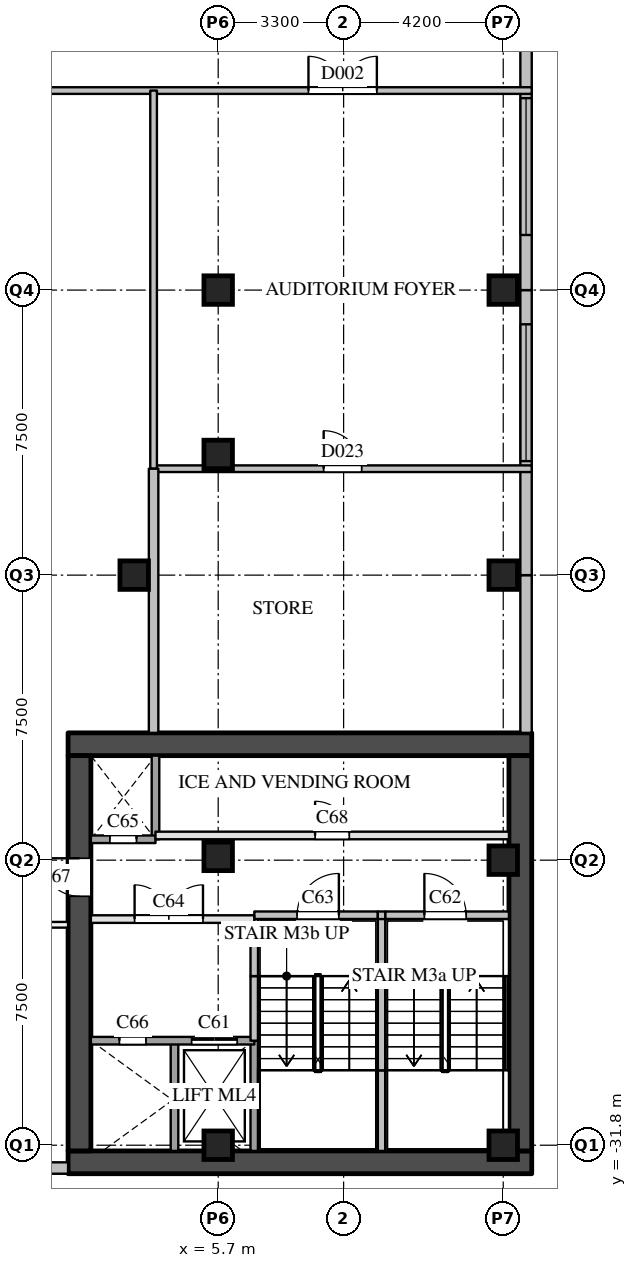
"""IFC4 building model, lengths in metres.
Left out: names, types, materials, properties, quantities, classifications, styles, units other than length and angle.
Written with IfcOpenShell. Run it as: python <this file> out.ifc"""

import sys

from ifc_helpers import new_model, si_unit, direction, frame, frame_2d, origin, origin_2d, place, context, subcontext, project, spatial, rectangle, extrude, element, fill, save


model = new_model("IFC4")
c1 = context("Model", 3, precision=1e-05, world=origin(), true_north=direction((0.0, 1.0)))
c2 = subcontext(c1, "Body", "Model", "MODEL_VIEW")
j1 = project(units=[si_unit("LENGTHUNIT", "METRE"), si_unit("PLANEANGLEUNIT", "RADIAN")], contexts=[c1])
p1 = place(None, origin())
s1 = spatial("IfcSite", under=j1, at=p1, CompositionType="ELEMENT")
p2 = place(p1, origin())
s2 = spatial("IfcBuilding", under=s1, at=p2, CompositionType="ELEMENT")
p3 = place(p2, frame((0.0, 0.0, 8.0)))
s3 = spatial("IfcBuildingStorey", under=s2, at=p3, CompositionType="ELEMENT", Elevation=8.0)
for number, where, z_axis, x_axis in (
    (1, (5.7, -31.8, 0.0), (0.0, 0.0, 1.0), (1.0, 0.0, 0.0)),
    (2, (5.7, -24.2, 0.0), (0.0, 0.0, 1.0), (1.0, 0.0, 0.0)),
    (3, (5.7, -9.3, 0.0), (0.0, 0.0, 1.0), (1.0, 0.0, 0.0)),
    (4, (13.2, -31.8, 0.0), (0.0, 0.0, 1.0), (1.0, 0.0, 0.0)),
    (5, (13.2, -24.3, 0.0), (0.0, 0.0, 1.0), (1.0, 0.0, 0.0)),
    (6, (13.2, -16.8, 0.0), (0.0, 0.0, 1.0), (1.0, 0.0, 0.0)),
    (7, (13.2, -9.3, 0.0), (0.0, 0.0, 1.0), (1.0, 0.0, 0.0)),
    (8, (5.7, -13.625, 0.0), (0.0, 0.0, 1.0), (1.0, 0.0, 0.0)),
):
    element("IfcColumn", number, at=place(p3, frame(where, z_axis=z_axis, x_axis=x_axis)), inside=s3, PredefinedType="COLUMN", context=c2, shape_type="SweptSolid", body=[
        extrude(rectangle(XDim=0.75, YDim=0.75, at=origin_2d()), origin(), (0.0, 0.0, 1.0), 6.0),
    ])
p4 = place(p3, frame((3.49, -16.8, 0.0), z_axis=(0.0, 0.0, 1.0), x_axis=(1.0, 0.0, 0.0)))
e9 = element("IfcColumn", 9, at=p4, inside=s3, PredefinedType="COLUMN", context=c2, shape_type="SweptSolid", body=[
    extrude(rectangle(XDim=0.75, YDim=0.75, at=origin_2d()), origin(), (0.0, 0.0, 1.0), 3.69),
])
p5 = place(p3, frame((-1.8, -32.4, 0.0), z_axis=(0.0, 0.0, 1.0), x_axis=(1.0, 0.0, 0.0)))
e10 = element("IfcWall", 10, at=p5, inside=s3, PredefinedType="SOLIDWALL", context=c2, shape_type="SweptSolid", body=[
    extrude(rectangle(XDim=3.55, YDim=0.3, at=frame_2d((1.775, 0.0))), origin(), (0.0, 0.0, 1.0), 5.59),
])
p6 = place(p3, frame((13.8, -20.95, 0.0), z_axis=(0.0, 0.0, 1.0), x_axis=(0.0, 1.0, 0.0)))
e11 = element("IfcWall", 11, at=p6, inside=s3, PredefinedType="SOLIDWALL", context=c2, shape_type="SweptSolid", body=[
    extrude(rectangle(XDim=4.15, YDim=0.3, at=frame_2d((2.075, 0.0))), origin(), (0.0, 0.0, 1.0), 5.59),
])
p7 = place(p3, frame((13.8, -16.8, 0.0), z_axis=(0.0, 0.0, 1.0), x_axis=(0.0, 1.0, 0.0)))
e12 = element("IfcWall", 12, at=p7, inside=s3, PredefinedType="SOLIDWALL", context=c2, shape_type="SweptSolid", body=[
    extrude(rectangle(XDim=7.5, YDim=0.3, at=frame_2d((3.75, 0.0))), origin(), (0.0, 0.0, 1.0), 5.59),
])
p8 = place(p7, frame((3.0, 0.0, 2.4)))
e13 = element("IfcOpeningElement", 13, at=p8, cuts=e12, PredefinedType="OPENING", context=c2, shape_type="SweptSolid", body=[
    extrude(rectangle(XDim=3.6, YDim=1.2, at=frame_2d((1.8, 0.6))), frame((0.0, 0.16, 0.0), z_axis=(0.0, -1.0, 0.0), x_axis=(1.0, 0.0, 0.0)), (0.0, 0.0, 1.0), 0.32),
])
p9 = place(p3, frame((13.8, -9.3, 0.0), z_axis=(0.0, 0.0, 1.0), x_axis=(0.0, 1.0, 0.0)))
e14 = element("IfcWall", 14, at=p9, inside=s3, PredefinedType="SOLIDWALL", context=c2, shape_type="SweptSolid", body=[
    extrude(rectangle(XDim=7.5, YDim=0.3, at=frame_2d((3.75, 0.0))), origin(), (0.0, 0.0, 1.0), 5.59),
])
p10 = place(p9, frame((1.45, 0.0, 2.4)))
e15 = element("IfcOpeningElement", 15, at=p10, cuts=e14, PredefinedType="OPENING", context=c2, shape_type="SweptSolid", body=[
    extrude(rectangle(XDim=3.6, YDim=1.2, at=frame_2d((1.8, 0.6))), frame((0.0, 0.16, 0.0), z_axis=(0.0, -1.0, 0.0), x_axis=(1.0, 0.0, 0.0)), (0.0, 0.0, 1.0), 0.32),
])
for number, where, z_axis, x_axis in (
    (16, (1.75, -32.25, 0.0), (0.0, 0.0, 1.0), (1.0, 0.0, 0.0)),
    (17, (1.75, -21.25, 0.0), (0.0, 0.0, 1.0), (1.0, 0.0, 0.0)),
):
    element("IfcWall", number, at=place(p3, frame(where, z_axis=z_axis, x_axis=x_axis)), inside=s3, PredefinedType="SHEAR", context=c2, shape_type="SweptSolid", body=[
        extrude(rectangle(XDim=12.2, YDim=0.6, at=frame_2d((6.1, 0.0))), origin(), (0.0, 0.0, 1.0), 5.59),
    ])
p11 = place(p3, frame((2.05, -31.95, 0.0), z_axis=(0.0, 0.0, 1.0), x_axis=(0.0, 1.0, 0.0)))
e18 = element("IfcWall", 18, at=p11, inside=s3, PredefinedType="SHEAR", context=c2, shape_type="SweptSolid", body=[
    extrude(rectangle(XDim=10.4, YDim=0.6, at=frame_2d((5.2, 0.0))), origin(), (0.0, 0.0, 1.0), 5.59),
])
p12 = place(p11, frame((6.7, 0.0, 0.0)))
e19 = element("IfcOpeningElement", 19, at=p12, cuts=e18, PredefinedType="OPENING", context=c2, shape_type="SweptSolid", body=[
    extrude(rectangle(XDim=1.0, YDim=2.1, at=frame_2d((0.5, 1.05))), frame((0.0, 0.31, 0.0), z_axis=(0.0, -1.0, 0.0), x_axis=(1.0, 0.0, 0.0)), (0.0, 0.0, 1.0), 0.62),
])
p13 = place(p3, frame((13.65, -31.95, 0.0), z_axis=(0.0, 0.0, 1.0), x_axis=(0.0, 1.0, 0.0)))
e20 = element("IfcWall", 20, at=p13, inside=s3, PredefinedType="SHEAR", context=c2, shape_type="SweptSolid", body=[
    extrude(rectangle(XDim=10.4, YDim=0.6, at=frame_2d((5.2, 0.0))), origin(), (0.0, 0.0, 1.0), 5.59),
])
p14 = place(p3, frame((4.05, -23.75, 0.0), z_axis=(0.0, 0.0, 1.0), x_axis=(0.0, 1.0, 0.0)))
e21 = element("IfcWall", 21, at=p14, inside=s3, PredefinedType="SOLIDWALL", context=c2, shape_type="SweptSolid", body=[
    extrude(rectangle(XDim=2.2, YDim=0.2, at=frame_2d((1.1, 0.0))), origin(), (0.0, 0.0, 1.0), 5.59),
])
for number, where, z_axis, x_axis in (
    (22, (4.55, -31.95, 0.0), (0.0, 0.0, 1.0), (0.0, 1.0, 0.0)),
    (23, (6.65, -31.95, 0.0), (0.0, 0.0, 1.0), (0.0, 1.0, 0.0)),
):
    element("IfcWall", number, at=place(p3, frame(where, z_axis=z_axis, x_axis=x_axis)), inside=s3, PredefinedType="SOLIDWALL", context=c2, shape_type="SweptSolid", body=[
        extrude(rectangle(XDim=2.9, YDim=0.2, at=frame_2d((1.45, 0.0))), origin(), (0.0, 0.0, 1.0), 5.59),
    ])
p15 = place(p3, frame((6.65, -29.05, 0.0), z_axis=(0.0, 0.0, 1.0), x_axis=(0.0, 1.0, 0.0)))
e24 = element("IfcWall", 24, at=p15, inside=s3, PredefinedType="SOLIDWALL", context=c2, shape_type="SweptSolid", body=[
    extrude(rectangle(XDim=1.7, YDim=0.2, at=frame_2d((0.85, 0.0))), origin(), (0.0, 0.0, 1.0), 5.59),
])
p16 = place(p3, frame((6.65, -27.35, 0.0), z_axis=(0.0, 0.0, 1.0), x_axis=(0.0, 1.0, 0.0)))
e25 = element("IfcWall", 25, at=p16, inside=s3, PredefinedType="SOLIDWALL", context=c2, shape_type="SweptSolid", body=[
    extrude(rectangle(XDim=1.6, YDim=0.2, at=frame_2d((0.8, 0.0))), origin(), (0.0, 0.0, 1.0), 5.59),
])
p17 = place(p3, frame((10.0, -31.95, 0.0), z_axis=(0.0, 0.0, 1.0), x_axis=(0.0, 1.0, 0.0)))
e26 = element("IfcWall", 26, at=p17, inside=s3, PredefinedType="SOLIDWALL", context=c2, shape_type="SweptSolid", body=[
    extrude(rectangle(XDim=2.12, YDim=0.2, at=frame_2d((1.06, 0.0))), origin(), (0.0, 0.0, 1.0), 5.59),
])
p18 = place(p3, frame((10.0, -29.83, 0.0), z_axis=(0.0, 0.0, 1.0), x_axis=(0.0, 1.0, 0.0)))
e27 = element("IfcWall", 27, at=p18, inside=s3, PredefinedType="SOLIDWALL", context=c2, shape_type="SweptSolid", body=[
    extrude(rectangle(XDim=2.48, YDim=0.2, at=frame_2d((1.24, 0.0))), origin(), (0.0, 0.0, 1.0), 5.59),
])
p19 = place(p3, frame((10.0, -27.35, 0.0), z_axis=(0.0, 0.0, 1.0), x_axis=(0.0, 1.0, 0.0)))
e28 = element("IfcWall", 28, at=p19, inside=s3, PredefinedType="SOLIDWALL", context=c2, shape_type="SweptSolid", body=[
    extrude(rectangle(XDim=1.6, YDim=0.2, at=frame_2d((0.8, 0.0))), origin(), (0.0, 0.0, 1.0), 5.59),
])
p20 = place(p3, frame((2.35, -29.05, 0.0), z_axis=(0.0, 0.0, 1.0), x_axis=(1.0, 0.0, 0.0)))
e29 = element("IfcWall", 29, at=p20, inside=s3, PredefinedType="SOLIDWALL", context=c2, shape_type="SweptSolid", body=[
    extrude(rectangle(XDim=4.3, YDim=0.2, at=frame_2d((2.15, 0.0))), origin(), (0.0, 0.0, 1.0), 5.59),
])
p21 = place(p20, frame((2.65, 0.0, 0.0)))
e30 = element("IfcOpeningElement", 30, at=p21, cuts=e29, PredefinedType="OPENING", context=c2, shape_type="SweptSolid", body=[
    extrude(rectangle(XDim=1.2, YDim=2.1, at=frame_2d((0.6, 1.05))), frame((0.0, 0.11, 0.0), z_axis=(0.0, -1.0, 0.0), x_axis=(1.0, 0.0, 0.0)), (0.0, 0.0, 1.0), 0.22),
])
p22 = place(p20, frame((0.75, 0.0, 0.0)))
e31 = element("IfcOpeningElement", 31, at=p22, cuts=e29, PredefinedType="OPENING", context=c2, shape_type="SweptSolid", body=[
    extrude(rectangle(XDim=0.7, YDim=2.1, at=frame_2d((0.35, 1.05))), frame((0.0, 0.11, 0.0), z_axis=(0.0, -1.0, 0.0), x_axis=(1.0, 0.0, 0.0)), (0.0, 0.0, 1.0), 0.22),
])
p23 = place(p3, frame((2.35, -25.85, 0.0), z_axis=(0.0, 0.0, 1.0), x_axis=(1.0, 0.0, 0.0)))
e32 = element("IfcWall", 32, at=p23, inside=s3, PredefinedType="PARTITIONING", context=c2, shape_type="SweptSolid", body=[
    extrude(rectangle(XDim=4.3, YDim=0.2, at=frame_2d((2.15, 0.0))), origin(), (0.0, 0.0, 1.0), 5.59),
])
p24 = place(p23, frame((1.15, 0.0, 0.0)))
e33 = element("IfcOpeningElement", 33, at=p24, cuts=e32, PredefinedType="OPENING", context=c2, shape_type="SweptSolid", body=[
    extrude(rectangle(XDim=1.8, YDim=2.1, at=frame_2d((0.9, 1.05))), frame((0.0, 0.11, 0.0), z_axis=(0.0, -1.0, 0.0), x_axis=(1.0, 0.0, 0.0)), (0.0, 0.0, 1.0), 0.22),
])
p25 = place(p3, frame((6.65, -25.75, 0.0), z_axis=(0.0, 0.0, 1.0), x_axis=(1.0, 0.0, 0.0)))
e34 = element("IfcWall", 34, at=p25, inside=s3, PredefinedType="SOLIDWALL", context=c2, shape_type="SweptSolid", body=[
    extrude(rectangle(XDim=3.25, YDim=0.2, at=frame_2d((1.625, 0.0))), origin(), (0.0, 0.0, 1.0), 5.59),
])
p26 = place(p25, frame((1.125, 0.0, 0.0)))
e35 = element("IfcOpeningElement", 35, at=p26, cuts=e34, PredefinedType="OPENING", context=c2, shape_type="SweptSolid", body=[
    extrude(rectangle(XDim=1.1, YDim=2.1, at=frame_2d((0.55, 1.05))), frame((0.0, 0.11, 0.0), z_axis=(0.0, -1.0, 0.0), x_axis=(1.0, 0.0, 0.0)), (0.0, 0.0, 1.0), 0.22),
])
p27 = place(p3, frame((9.9, -25.75, 0.0), z_axis=(0.0, 0.0, 1.0), x_axis=(1.0, 0.0, 0.0)))
e36 = element("IfcWall", 36, at=p27, inside=s3, PredefinedType="SOLIDWALL", context=c2, shape_type="SweptSolid", body=[
    extrude(rectangle(XDim=0.2, YDim=0.2, at=frame_2d((0.1, 0.0))), origin(), (0.0, 0.0, 1.0), 5.59),
])
p28 = place(p3, frame((10.1, -25.75, 0.0), z_axis=(0.0, 0.0, 1.0), x_axis=(1.0, 0.0, 0.0)))
e37 = element("IfcWall", 37, at=p28, inside=s3, PredefinedType="SOLIDWALL", context=c2, shape_type="SweptSolid", body=[
    extrude(rectangle(XDim=3.25, YDim=0.2, at=frame_2d((1.625, 0.0))), origin(), (0.0, 0.0, 1.0), 5.59),
])
p29 = place(p28, frame((1.025, 0.0, 0.0)))
e38 = element("IfcOpeningElement", 38, at=p29, cuts=e37, PredefinedType="OPENING", context=c2, shape_type="SweptSolid", body=[
    extrude(rectangle(XDim=1.1, YDim=2.1, at=frame_2d((0.55, 1.05))), frame((0.0, 0.11, 0.0), z_axis=(0.0, -1.0, 0.0), x_axis=(1.0, 0.0, 0.0)), (0.0, 0.0, 1.0), 0.22),
])
p30 = place(p3, frame((4.05, -23.65, 0.0), z_axis=(0.0, 0.0, 1.0), x_axis=(1.0, 0.0, 0.0)))
e39 = element("IfcWall", 39, at=p30, inside=s3, PredefinedType="PARTITIONING", context=c2, shape_type="SweptSolid", body=[
    extrude(rectangle(XDim=9.3, YDim=0.2, at=frame_2d((4.65, 0.0))), origin(), (0.0, 0.0, 1.0), 5.59),
])
p31 = place(p30, frame((4.2, 0.0, 0.0)))
e40 = element("IfcOpeningElement", 40, at=p31, cuts=e39, PredefinedType="OPENING", context=c2, shape_type="SweptSolid", body=[
    extrude(rectangle(XDim=0.9, YDim=2.1, at=frame_2d((0.45, 1.05))), frame((0.0, 0.11, 0.0), z_axis=(0.0, -1.0, 0.0), x_axis=(1.0, 0.0, 0.0)), (0.0, 0.0, 1.0), 0.22),
])
p32 = place(p3, frame((2.35, -23.75, 0.0), z_axis=(0.0, 0.0, 1.0), x_axis=(1.0, 0.0, 0.0)))
e41 = element("IfcWall", 41, at=p32, inside=s3, PredefinedType="SOLIDWALL", context=c2, shape_type="SweptSolid", body=[
    extrude(rectangle(XDim=1.7, YDim=0.2, at=frame_2d((0.85, 0.0))), origin(), (0.0, 0.0, 1.0), 5.59),
])
p33 = place(p32, frame((0.5, 0.0, 0.0)))
e42 = element("IfcOpeningElement", 42, at=p33, cuts=e41, PredefinedType="OPENING", context=c2, shape_type="SweptSolid", body=[
    extrude(rectangle(XDim=0.7, YDim=2.1, at=frame_2d((0.35, 1.05))), frame((0.0, 0.11, 0.0), z_axis=(0.0, -1.0, 0.0), x_axis=(1.0, 0.0, 0.0)), (0.0, 0.0, 1.0), 0.22),
])
p34 = place(p3, frame((4.0, -14.0, 0.0), z_axis=(0.0, 0.0, 1.0), x_axis=(1.0, 0.0, 0.0)))
e43 = element("IfcWall", 43, at=p34, inside=s3, PredefinedType="PARTITIONING", context=c2, shape_type="SweptSolid", body=[
    extrude(rectangle(XDim=9.95, YDim=0.175, at=frame_2d((4.975, 0.0))), origin(), (0.0, 0.0, 1.0), 4.79),
])
p35 = place(p34, frame((4.475, 0.0, 0.0)))
e44 = element("IfcOpeningElement", 44, at=p35, cuts=e43, PredefinedType="OPENING", context=c2, shape_type="SweptSolid", body=[
    extrude(rectangle(XDim=1.0, YDim=2.1, at=frame_2d((0.5, 1.05))), frame((0.0, 0.097, 0.0), z_axis=(0.0, -1.0, 0.0), x_axis=(1.0, 0.0, 0.0)), (0.0, 0.0, 1.0), 0.195),
])
p36 = place(p3, frame((-9.3, -4.05, 0.0), z_axis=(0.0, 0.0, 1.0), x_axis=(1.0, 0.0, 0.0)))
e45 = element("IfcWall", 45, at=p36, inside=s3, PredefinedType="PARTITIONING", context=c2, shape_type="SweptSolid", body=[
    extrude(rectangle(XDim=23.25, YDim=0.175, at=frame_2d((11.625, 0.0))), origin(), (0.0, 0.0, 1.0), 4.79),
])
p37 = place(p36, frame((17.375, 0.0, 0.0)))
e46 = element("IfcOpeningElement", 46, at=p37, cuts=e45, PredefinedType="OPENING", context=c2, shape_type="SweptSolid", body=[
    extrude(rectangle(XDim=1.8, YDim=2.1, at=frame_2d((0.9, 1.05))), frame((0.0, 0.097, 0.0), z_axis=(0.0, -1.0, 0.0), x_axis=(1.0, 0.0, 0.0)), (0.0, 0.0, 1.0), 0.195),
])
p38 = place(p36, frame((2.125, 0.0, 0.0)))
e47 = element("IfcOpeningElement", 47, at=p38, cuts=e45, PredefinedType="OPENING", context=c2, shape_type="SweptSolid", body=[
    extrude(rectangle(XDim=1.0, YDim=2.1, at=frame_2d((0.5, 1.05))), frame((0.0, 0.097, 0.0), z_axis=(0.0, -1.0, 0.0), x_axis=(1.0, 0.0, 0.0)), (0.0, 0.0, 1.0), 0.195),
])
p39 = place(p3, frame((4.0, -14.0, 0.0), z_axis=(0.0, 0.0, 1.0), x_axis=(0.0, 1.0, 0.0)))
e48 = element("IfcWall", 48, at=p39, inside=s3, PredefinedType="PARTITIONING", context=c2, shape_type="SweptSolid", body=[
    extrude(rectangle(XDim=9.95, YDim=0.175, at=frame_2d((4.975, 0.0))), origin(), (0.0, 0.0, 1.0), 3.69),
])
p40 = place(p3, frame((-9.3, -26.0, 0.0), z_axis=(0.0, 0.0, 1.0), x_axis=(1.0, 0.0, 0.0)))
e49 = element("IfcWall", 49, at=p40, inside=s3, PredefinedType="PARTITIONING", context=c2, shape_type="SweptSolid", body=[
    extrude(rectangle(XDim=11.05, YDim=0.15, at=frame_2d((5.525, 0.0))), origin(), (0.0, 0.0, 1.0), 4.79),
])
p41 = place(p40, frame((5.025, 0.0, 0.0)))
e50 = element("IfcOpeningElement", 50, at=p41, cuts=e49, PredefinedType="OPENING", context=c2, shape_type="SweptSolid", body=[
    extrude(rectangle(XDim=1.0, YDim=2.1, at=frame_2d((0.5, 1.05))), frame((0.0, 0.085, 0.0), z_axis=(0.0, -1.0, 0.0), x_axis=(1.0, 0.0, 0.0)), (0.0, 0.0, 1.0), 0.17),
])
p42 = place(p3, frame((4.0, -20.95, 0.0), z_axis=(0.0, 0.0, 1.0), x_axis=(0.0, 1.0, 0.0)))
e51 = element("IfcWall", 51, at=p42, inside=s3, PredefinedType="PARTITIONING", context=c2, shape_type="SweptSolid", body=[
    extrude(rectangle(XDim=6.95, YDim=0.25, at=frame_2d((3.475, 0.0))), origin(), (0.0, 0.0, 1.0), 5.59),
])
p43 = place(p8, origin())
e52 = element("IfcWindow", 52, at=p43, inside=s3, PartitioningType="SINGLE_PANEL", PredefinedType="WINDOW", context=c2, shape_type="SweptSolid", body=[
    extrude(rectangle(XDim=3.6, YDim=1.2, at=frame_2d((1.8, 0.6))), frame((0.0, 0.03, 0.0), z_axis=(0.0, -1.0, 0.0), x_axis=(1.0, 0.0, 0.0)), (0.0, 0.0, 1.0), 0.06),
])
fill(e13, e52)
p44 = place(p10, origin())
e53 = element("IfcWindow", 53, at=p44, inside=s3, PartitioningType="SINGLE_PANEL", PredefinedType="WINDOW", context=c2, shape_type="SweptSolid", body=[
    extrude(rectangle(XDim=3.6, YDim=1.2, at=frame_2d((1.8, 0.6))), frame((0.0, 0.03, 0.0), z_axis=(0.0, -1.0, 0.0), x_axis=(1.0, 0.0, 0.0)), (0.0, 0.0, 1.0), 0.06),
])
fill(e15, e53)
p45 = place(p21, origin())
e54 = element("IfcDoor", 54, at=p45, inside=s3, OperationType="SLIDING_TO_LEFT", PredefinedType="DOOR", context=c2, shape_type="SweptSolid", body=[
    extrude(rectangle(XDim=1.2, YDim=2.1, at=frame_2d((0.6, 1.05))), frame((0.0, 0.025, 0.0), z_axis=(0.0, -1.0, 0.0), x_axis=(1.0, 0.0, 0.0)), (0.0, 0.0, 1.0), 0.05),
])
fill(e30, e54)
p46 = place(p29, origin())
e55 = element("IfcDoor", 55, at=p46, inside=s3, OperationType="SINGLE_SWING_LEFT", PredefinedType="DOOR", context=c2, shape_type="SweptSolid", body=[
    extrude(rectangle(XDim=1.1, YDim=2.1, at=frame_2d((0.55, 1.05))), frame((0.0, 0.025, 0.0), z_axis=(0.0, -1.0, 0.0), x_axis=(1.0, 0.0, 0.0)), (0.0, 0.0, 1.0), 0.05),
])
fill(e38, e55)
p47 = place(p26, origin())
e56 = element("IfcDoor", 56, at=p47, inside=s3, OperationType="SINGLE_SWING_RIGHT", PredefinedType="DOOR", context=c2, shape_type="SweptSolid", body=[
    extrude(rectangle(XDim=1.1, YDim=2.1, at=frame_2d((0.55, 1.05))), frame((0.0, 0.025, 0.0), z_axis=(0.0, -1.0, 0.0), x_axis=(1.0, 0.0, 0.0)), (0.0, 0.0, 1.0), 0.05),
])
fill(e35, e56)
p48 = place(p24, origin())
e57 = element("IfcDoor", 57, at=p48, inside=s3, OperationType="DOUBLE_DOOR_SINGLE_SWING", PredefinedType="DOOR", context=c2, shape_type="SweptSolid", body=[
    extrude(rectangle(XDim=1.8, YDim=2.1, at=frame_2d((0.9, 1.05))), frame((0.0, 0.025, 0.0), z_axis=(0.0, -1.0, 0.0), x_axis=(1.0, 0.0, 0.0)), (0.0, 0.0, 1.0), 0.05),
])
fill(e33, e57)
p49 = place(p33, origin())
e58 = element("IfcDoor", 58, at=p49, inside=s3, OperationType="SINGLE_SWING_RIGHT", PredefinedType="DOOR", context=c2, shape_type="SweptSolid", body=[
    extrude(rectangle(XDim=0.7, YDim=2.1, at=frame_2d((0.35, 1.05))), frame((0.0, 0.025, 0.0), z_axis=(0.0, -1.0, 0.0), x_axis=(1.0, 0.0, 0.0)), (0.0, 0.0, 1.0), 0.05),
])
fill(e42, e58)
p50 = place(p22, origin())
e59 = element("IfcDoor", 59, at=p50, inside=s3, OperationType="SINGLE_SWING_LEFT", PredefinedType="DOOR", context=c2, shape_type="SweptSolid", body=[
    extrude(rectangle(XDim=0.7, YDim=2.1, at=frame_2d((0.35, 1.05))), frame((0.0, 0.025, 0.0), z_axis=(0.0, -1.0, 0.0), x_axis=(1.0, 0.0, 0.0)), (0.0, 0.0, 1.0), 0.05),
])
fill(e31, e59)
p51 = place(p12, origin())
e60 = element("IfcDoor", 60, at=p51, inside=s3, OperationType="SINGLE_SWING_RIGHT", PredefinedType="DOOR", context=c2, shape_type="SweptSolid", body=[
    extrude(rectangle(XDim=1.0, YDim=2.1, at=frame_2d((0.5, 1.05))), frame((0.0, 0.025, 0.0), z_axis=(0.0, -1.0, 0.0), x_axis=(1.0, 0.0, 0.0)), (0.0, 0.0, 1.0), 0.05),
])
fill(e19, e60)
p52 = place(p31, origin())
e61 = element("IfcDoor", 61, at=p52, inside=s3, OperationType="SINGLE_SWING_LEFT", PredefinedType="DOOR", context=c2, shape_type="SweptSolid", body=[
    extrude(rectangle(XDim=0.9, YDim=2.1, at=frame_2d((0.45, 1.05))), frame((0.0, 0.025, 0.0), z_axis=(0.0, -1.0, 0.0), x_axis=(1.0, 0.0, 0.0)), (0.0, 0.0, 1.0), 0.05),
])
fill(e40, e61)
p53 = place(p37, origin())
e62 = element("IfcDoor", 62, at=p53, inside=s3, OperationType="DOUBLE_DOOR_SINGLE_SWING", PredefinedType="DOOR", context=c2, shape_type="SweptSolid", body=[
    extrude(rectangle(XDim=1.8, YDim=2.1, at=frame_2d((0.9, 1.05))), frame((0.0, 0.025, 0.0), z_axis=(0.0, -1.0, 0.0), x_axis=(1.0, 0.0, 0.0)), (0.0, 0.0, 1.0), 0.05),
])
fill(e46, e62)
p54 = place(p35, origin())
e63 = element("IfcDoor", 63, at=p54, inside=s3, OperationType="SINGLE_SWING_LEFT", PredefinedType="DOOR", context=c2, shape_type="SweptSolid", body=[
    extrude(rectangle(XDim=1.0, YDim=2.1, at=frame_2d((0.5, 1.05))), frame((0.0, 0.025, 0.0), z_axis=(0.0, -1.0, 0.0), x_axis=(1.0, 0.0, 0.0)), (0.0, 0.0, 1.0), 0.05),
])
fill(e44, e63)
save(model, sys.argv[1])
